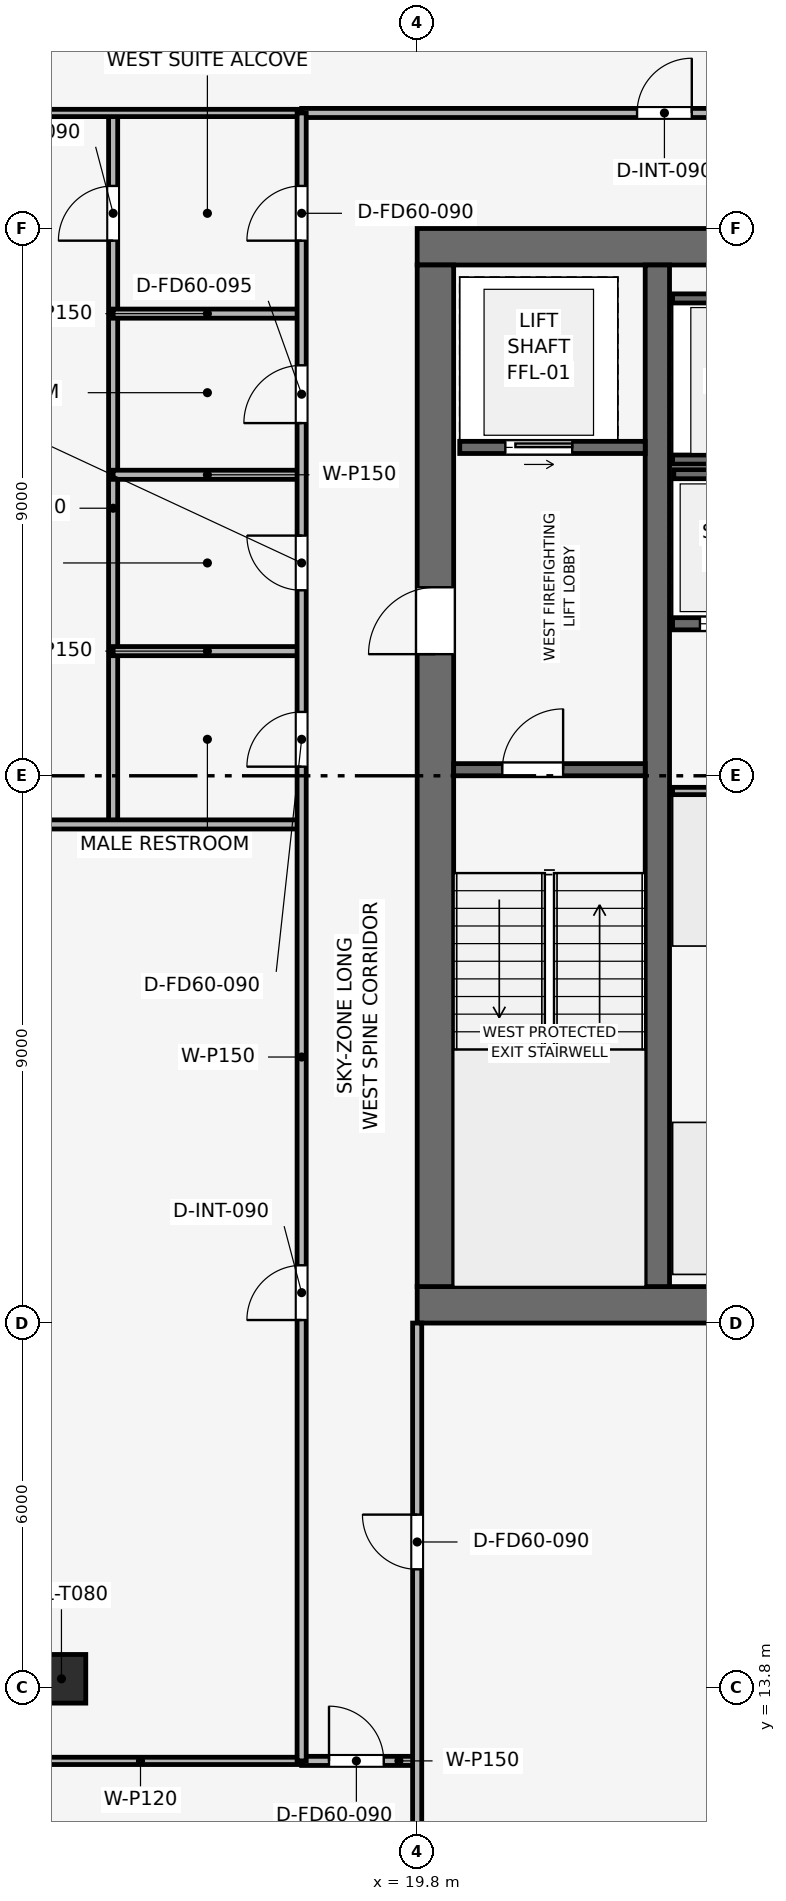
"""IFC4 building model, lengths in metres.
Left out: names, types, materials, properties, quantities, classifications, styles, units other than length and angle.
Written with IfcOpenShell. Run it as: python <this file> out.ifc"""

import sys

from ifc_helpers import new_model, si_unit, direction, frame, frame_2d, origin, origin_2d, place, context, subcontext, project, spatial, rectangle, extrude, element, fill, save


model = new_model("IFC4")
c1 = context("Model", 3, precision=1e-05, world=origin(), true_north=direction((0.0, 1.0)))
c2 = subcontext(c1, "Body", "Model", "MODEL_VIEW")
j1 = project(units=[si_unit("LENGTHUNIT", "METRE"), si_unit("PLANEANGLEUNIT", "RADIAN")], contexts=[c1])
p1 = place(None, origin())
s1 = spatial("IfcSite", under=j1, at=p1, CompositionType="ELEMENT")
p2 = place(p1, origin())
s2 = spatial("IfcBuilding", under=s1, at=p2, CompositionType="ELEMENT")
p3 = place(p2, frame((0.0, 0.0, 336.75)))
s3 = spatial("IfcBuildingStorey", under=s2, at=p3, CompositionType="ELEMENT", Elevation=336.75)
p4 = place(p3, frame((19.8, 20.1, 0.0), z_axis=(0.0, 0.0, 1.0), x_axis=(1.0, 0.0, 0.0)))
e1 = element("IfcWall", 1, at=p4, inside=s3, PredefinedType="SHEAR", context=c2, shape_type="SweptSolid", body=[
    extrude(rectangle(XDim=18.0, YDim=0.6, at=frame_2d((9.0, 0.0))), origin(), (0.0, 0.0, 1.0), 3.75),
])
p5 = place(p3, frame((19.8, 37.5, 0.0), z_axis=(0.0, 0.0, 1.0), x_axis=(1.0, 0.0, 0.0)))
e2 = element("IfcWall", 2, at=p5, inside=s3, PredefinedType="SHEAR", context=c2, shape_type="SweptSolid", body=[
    extrude(rectangle(XDim=18.0, YDim=0.6, at=frame_2d((9.0, 0.0))), origin(), (0.0, 0.0, 1.0), 3.75),
])
p6 = place(p5, frame((7.05, 0.0, 0.0)))
e3 = element("IfcOpeningElement", 3, at=p6, cuts=e2, PredefinedType="OPENING", context=c2, shape_type="SweptSolid", body=[
    extrude(rectangle(XDim=1.1, YDim=2.15, at=frame_2d((0.55, 1.075))), frame((0.0, 0.31, 0.0), z_axis=(0.0, -1.0, 0.0), x_axis=(1.0, 0.0, 0.0)), (0.0, 0.0, 1.0), 0.62),
])
p7 = place(p3, frame((20.1, 20.4, 0.0), z_axis=(0.0, 0.0, 1.0), x_axis=(0.0, 1.0, 0.0)))
e4 = element("IfcWall", 4, at=p7, inside=s3, PredefinedType="SHEAR", context=c2, shape_type="SweptSolid", body=[
    extrude(rectangle(XDim=16.8, YDim=0.6, at=frame_2d((8.4, 0.0))), origin(), (0.0, 0.0, 1.0), 3.75),
])
p8 = place(p7, frame((10.4, 0.0, 0.0)))
e5 = element("IfcOpeningElement", 5, at=p8, cuts=e4, PredefinedType="OPENING", context=c2, shape_type="SweptSolid", body=[
    extrude(rectangle(XDim=1.1, YDim=2.15, at=frame_2d((0.55, 1.075))), frame((0.0, 0.31, 0.0), z_axis=(0.0, -1.0, 0.0), x_axis=(1.0, 0.0, 0.0)), (0.0, 0.0, 1.0), 0.62),
])
p9 = place(p3, frame((23.75, 20.4, 0.0), z_axis=(0.0, 0.0, 1.0), x_axis=(0.0, 1.0, 0.0)))
e6 = element("IfcWall", 6, at=p9, inside=s3, PredefinedType="SHEAR", context=c2, shape_type="SweptSolid", body=[
    extrude(rectangle(XDim=16.8, YDim=0.4, at=frame_2d((8.4, 0.0))), origin(), (0.0, 0.0, 1.0), 3.75),
])
p10 = place(p3, frame((13.95, 13.95, 0.003), z_axis=(0.0, 0.0, 1.0), x_axis=(1.0, 0.0, 0.0)))
e7 = element("IfcColumn", 7, at=p10, inside=s3, PredefinedType="COLUMN", context=c2, shape_type="SweptSolid", body=[
    extrude(rectangle(XDim=0.8, YDim=0.8, at=origin_2d()), origin(), (0.0, 0.0, 1.0), 3.504),
])
p11 = place(p3, frame((20.4, 28.9, 0.0), z_axis=(0.0, 0.0, 1.0), x_axis=(1.0, 0.0, 0.0)))
e8 = element("IfcWall", 8, at=p11, inside=s3, PredefinedType="SHEAR", context=c2, shape_type="SweptSolid", body=[
    extrude(rectangle(XDim=3.15, YDim=0.2, at=frame_2d((1.575, 0.0))), origin(), (0.0, 0.0, 1.0), 3.51),
])
p12 = place(p11, frame((0.8, 0.0, 0.0)))
e9 = element("IfcOpeningElement", 9, at=p12, cuts=e8, PredefinedType="OPENING", context=c2, shape_type="SweptSolid", body=[
    extrude(rectangle(XDim=1.0, YDim=2.1, at=frame_2d((0.5, 1.05))), frame((0.0, 0.11, 0.0), z_axis=(0.0, -1.0, 0.0), x_axis=(1.0, 0.0, 0.0)), (0.0, 0.0, 1.0), 0.22),
])
p13 = place(p3, frame((20.5, 34.2, 0.0), z_axis=(0.0, 0.0, 1.0), x_axis=(1.0, 0.0, 0.0)))
e10 = element("IfcWall", 10, at=p13, inside=s3, PredefinedType="SHEAR", context=c2, shape_type="SweptSolid", body=[
    extrude(rectangle(XDim=3.05, YDim=0.2, at=frame_2d((1.525, 0.0))), origin(), (0.0, 0.0, 1.0), 3.51),
])
p14 = place(p13, frame((0.75, 0.0, 0.0)))
e11 = element("IfcOpeningElement", 11, at=p14, cuts=e10, PredefinedType="OPENING", context=c2, shape_type="SweptSolid", body=[
    extrude(rectangle(XDim=1.1, YDim=2.15, at=frame_2d((0.55, 1.075))), frame((0.0, 0.11, 0.0), z_axis=(0.0, -1.0, 0.0), x_axis=(1.0, 0.0, 0.0)), (0.0, 0.0, 1.0), 0.22),
])
for number, where, z_axis, x_axis in (
    (12, (24.0, 34.0, 0.0), (0.0, 0.0, 1.0), (1.0, 0.0, 0.0)),
    (13, (24.0, 36.65, 0.0), (0.0, 0.0, 1.0), (1.0, 0.0, 0.0)),
):
    element("IfcWall", number, at=place(p3, frame(where, z_axis=z_axis, x_axis=x_axis)), inside=s3, PredefinedType="SHEAR", context=c2, shape_type="SweptSolid", body=[
        extrude(rectangle(XDim=2.48, YDim=0.15, at=frame_2d((1.24, 0.0))), origin(), (0.0, 0.0, 1.0), 3.51),
    ])
p15 = place(p3, frame((24.0, 31.3, 0.0), z_axis=(0.0, 0.0, 1.0), x_axis=(1.0, 0.0, 0.0)))
e14 = element("IfcWall", 14, at=p15, inside=s3, PredefinedType="SHEAR", context=c2, shape_type="SweptSolid", body=[
    extrude(rectangle(XDim=2.0, YDim=0.2, at=frame_2d((1.0, 0.0))), origin(), (0.0, 0.0, 1.0), 3.51),
])
p16 = place(p15, frame((0.45, 0.0, 0.0)))
e15 = element("IfcOpeningElement", 15, at=p16, cuts=e14, PredefinedType="OPENING", context=c2, shape_type="SweptSolid", body=[
    extrude(rectangle(XDim=1.1, YDim=2.15, at=frame_2d((0.55, 1.075))), frame((0.0, 0.11, 0.0), z_axis=(0.0, -1.0, 0.0), x_axis=(1.0, 0.0, 0.0)), (0.0, 0.0, 1.0), 0.22),
])
p17 = place(p3, frame((24.02, 33.76, 0.0), z_axis=(0.0, 0.0, 1.0), x_axis=(1.0, 0.0, 0.0)))
e16 = element("IfcWall", 16, at=p17, inside=s3, PredefinedType="SHEAR", context=c2, shape_type="SweptSolid", body=[
    extrude(rectangle(XDim=4.08, YDim=0.15, at=frame_2d((2.04, 0.0))), origin(), (0.0, 0.0, 1.0), 3.51),
])
p18 = place(p3, frame((24.0, 28.55, 0.0), z_axis=(0.0, 0.0, 1.0), x_axis=(1.0, 0.0, 0.0)))
e17 = element("IfcWall", 17, at=p18, inside=s3, PredefinedType="PARTITIONING", context=c2, shape_type="SweptSolid", body=[
    extrude(rectangle(XDim=4.05, YDim=0.12, at=frame_2d((2.025, 0.0))), origin(), (0.0, 0.0, 1.0), 3.51),
])
p19 = place(p18, frame((1.575, 0.0, 0.0)))
e18 = element("IfcOpeningElement", 18, at=p19, cuts=e17, PredefinedType="OPENING", context=c2, shape_type="SweptSolid", body=[
    extrude(rectangle(XDim=0.9, YDim=2.1, at=frame_2d((0.45, 1.05))), frame((0.0, 0.07, 0.0), z_axis=(0.0, -1.0, 0.0), x_axis=(1.0, 0.0, 0.0)), (0.0, 0.0, 1.0), 0.14),
])
p20 = place(p3, frame((14.8, 28.0, 0.0), z_axis=(0.0, 0.0, 1.0), x_axis=(0.0, 1.0, 0.0)))
e19 = element("IfcWall", 19, at=p20, inside=s3, PredefinedType="PARTITIONING", context=c2, shape_type="SweptSolid", body=[
    extrude(rectangle(XDim=11.7, YDim=0.15, at=frame_2d((5.85, 0.0))), origin(), (0.0, 0.0, 1.0), 3.095),
])
p21 = place(p20, frame((9.6, 0.0, 0.0)))
e20 = element("IfcOpeningElement", 20, at=p21, cuts=e19, PredefinedType="OPENING", context=c2, shape_type="SweptSolid", body=[
    extrude(rectangle(XDim=0.9, YDim=2.1, at=frame_2d((0.45, 1.05))), frame((0.0, 0.085, 0.0), z_axis=(0.0, -1.0, 0.0), x_axis=(1.0, 0.0, 0.0)), (0.0, 0.0, 1.0), 0.17),
])
p22 = place(p3, frame((6.73, 28.0, 0.0), z_axis=(0.0, 0.0, 1.0), x_axis=(1.0, 0.0, 0.0)))
e21 = element("IfcWall", 21, at=p22, inside=s3, PredefinedType="PARTITIONING", context=c2, shape_type="SweptSolid", body=[
    extrude(rectangle(XDim=11.17, YDim=0.15, at=frame_2d((5.585, 0.0))), origin(), (0.0, 0.0, 1.0), 3.135),
])
for number, where, z_axis, x_axis in (
    (22, (14.8, 36.4, 0.0), (0.0, 0.0, 1.0), (1.0, 0.0, 0.0)),
    (23, (14.8, 30.85, 0.0), (0.0, 0.0, 1.0), (1.0, 0.0, 0.0)),
    (24, (14.8, 33.75, 0.0), (0.0, 0.0, 1.0), (1.0, 0.0, 0.0)),
):
    element("IfcWall", number, at=place(p3, frame(where, z_axis=z_axis, x_axis=x_axis)), inside=s3, PredefinedType="PARTITIONING", context=c2, shape_type="SweptSolid", body=[
        extrude(rectangle(XDim=3.1, YDim=0.15, at=frame_2d((1.55, 0.0))), origin(), (0.0, 0.0, 1.0), 3.135),
    ])
p23 = place(p3, frame((12.6, 12.6, 0.0), z_axis=(0.0, 0.0, 1.0), x_axis=(1.0, 0.0, 0.0)))
e25 = element("IfcWall", 25, at=p23, inside=s3, PredefinedType="PARTITIONING", context=c2, shape_type="SweptSolid", body=[
    extrude(rectangle(XDim=5.3, YDim=0.12, at=frame_2d((2.65, 0.0))), origin(), (0.0, 0.0, 1.0), 3.195),
])
p24 = place(p3, frame((17.9, 12.6, 0.0), z_axis=(0.0, 0.0, 1.0), x_axis=(1.0, 0.0, 0.0)))
e26 = element("IfcWall", 26, at=p24, inside=s3, PredefinedType="PARTITIONING", context=c2, shape_type="SweptSolid", body=[
    extrude(rectangle(XDim=1.9, YDim=0.15, at=frame_2d((0.95, 0.0))), origin(), (0.0, 0.0, 1.0), 3.51),
])
p25 = place(p24, frame((0.45, 0.0, 0.0)))
e27 = element("IfcOpeningElement", 27, at=p25, cuts=e26, PredefinedType="OPENING", context=c2, shape_type="SweptSolid", body=[
    extrude(rectangle(XDim=0.9, YDim=2.1, at=frame_2d((0.45, 1.05))), frame((0.0, 0.085, 0.0), z_axis=(0.0, -1.0, 0.0), x_axis=(1.0, 0.0, 0.0)), (0.0, 0.0, 1.0), 0.17),
])
p26 = place(p3, frame((19.8, 6.73, 0.0), z_axis=(0.0, 0.0, 1.0), x_axis=(0.0, 1.0, 0.0)))
e28 = element("IfcWall", 28, at=p26, inside=s3, PredefinedType="PARTITIONING", context=c2, shape_type="SweptSolid", body=[
    extrude(rectangle(XDim=13.07, YDim=0.15, at=frame_2d((6.535, 0.0))), origin(), (0.0, 0.0, 1.0), 3.095),
])
p27 = place(p26, frame((9.02, 0.0, 0.0)))
e29 = element("IfcOpeningElement", 29, at=p27, cuts=e28, PredefinedType="OPENING", context=c2, shape_type="SweptSolid", body=[
    extrude(rectangle(XDim=0.9, YDim=2.1, at=frame_2d((0.45, 1.05))), frame((0.0, 0.085, 0.0), z_axis=(0.0, -1.0, 0.0), x_axis=(1.0, 0.0, 0.0)), (0.0, 0.0, 1.0), 0.17),
])
p28 = place(p3, frame((6.73, 39.7, 0.0), z_axis=(0.0, 0.0, 1.0), x_axis=(1.0, 0.0, 0.0)))
e30 = element("IfcWall", 30, at=p28, inside=s3, PredefinedType="PARTITIONING", context=c2, shape_type="SweptSolid", body=[
    extrude(rectangle(XDim=11.17, YDim=0.12, at=frame_2d((5.585, 0.0))), origin(), (0.0, 0.0, 1.0), 3.095),
])
p29 = place(p3, frame((17.9, 39.7, 0.0), z_axis=(0.0, 0.0, 1.0), x_axis=(1.0, 0.0, 0.0)))
e31 = element("IfcWall", 31, at=p29, inside=s3, PredefinedType="PARTITIONING", context=c2, shape_type="SweptSolid", body=[
    extrude(rectangle(XDim=21.8, YDim=0.15, at=frame_2d((10.9, 0.0))), origin(), (0.0, 0.0, 1.0), 3.095),
])
p30 = place(p29, frame((5.516, 0.0, 0.0)))
e32 = element("IfcOpeningElement", 32, at=p30, cuts=e31, PredefinedType="OPENING", context=c2, shape_type="SweptSolid", body=[
    extrude(rectangle(XDim=0.9, YDim=2.1, at=frame_2d((0.45, 1.05))), frame((0.0, 0.085, 0.0), z_axis=(0.0, -1.0, 0.0), x_axis=(1.0, 0.0, 0.0)), (0.0, 0.0, 1.0), 0.17),
])
p31 = place(p29, frame((16.416, 0.0, 0.0)))
e33 = element("IfcOpeningElement", 33, at=p31, cuts=e31, PredefinedType="OPENING", context=c2, shape_type="SweptSolid", body=[
    extrude(rectangle(XDim=0.9, YDim=2.1, at=frame_2d((0.45, 1.05))), frame((0.0, 0.085, 0.0), z_axis=(0.0, -1.0, 0.0), x_axis=(1.0, 0.0, 0.0)), (0.0, 0.0, 1.0), 0.17),
])
p32 = place(p3, frame((17.9, 12.6, 0.0), z_axis=(0.0, 0.0, 1.0), x_axis=(0.0, 1.0, 0.0)))
e34 = element("IfcWall", 34, at=p32, inside=s3, PredefinedType="PARTITIONING", context=c2, shape_type="SweptSolid", body=[
    extrude(rectangle(XDim=27.1, YDim=0.15, at=frame_2d((13.55, 0.0))), origin(), (0.0, 0.0, 1.0), 3.095),
])
p33 = place(p32, frame((7.25, 0.0, 0.0)))
e35 = element("IfcOpeningElement", 35, at=p33, cuts=e34, PredefinedType="OPENING", context=c2, shape_type="SweptSolid", body=[
    extrude(rectangle(XDim=0.9, YDim=2.1, at=frame_2d((0.45, 1.05))), frame((0.0, 0.085, 0.0), z_axis=(0.0, -1.0, 0.0), x_axis=(1.0, 0.0, 0.0)), (0.0, 0.0, 1.0), 0.17),
])
p34 = place(p32, frame((16.35, 0.0, 0.0)))
e36 = element("IfcOpeningElement", 36, at=p34, cuts=e34, PredefinedType="OPENING", context=c2, shape_type="SweptSolid", body=[
    extrude(rectangle(XDim=0.9, YDim=2.1, at=frame_2d((0.45, 1.05))), frame((0.0, 0.085, 0.0), z_axis=(0.0, -1.0, 0.0), x_axis=(1.0, 0.0, 0.0)), (0.0, 0.0, 1.0), 0.17),
])
p35 = place(p32, frame((19.25, 0.0, 0.0)))
e37 = element("IfcOpeningElement", 37, at=p35, cuts=e34, PredefinedType="OPENING", context=c2, shape_type="SweptSolid", body=[
    extrude(rectangle(XDim=0.9, YDim=2.1, at=frame_2d((0.45, 1.05))), frame((0.0, 0.085, 0.0), z_axis=(0.0, -1.0, 0.0), x_axis=(1.0, 0.0, 0.0)), (0.0, 0.0, 1.0), 0.17),
])
p36 = place(p32, frame((22.0, 0.0, 0.0)))
e38 = element("IfcOpeningElement", 38, at=p36, cuts=e34, PredefinedType="OPENING", context=c2, shape_type="SweptSolid", body=[
    extrude(rectangle(XDim=0.95, YDim=2.1, at=frame_2d((0.475, 1.05))), frame((0.0, 0.085, 0.0), z_axis=(0.0, -1.0, 0.0), x_axis=(1.0, 0.0, 0.0)), (0.0, 0.0, 1.0), 0.17),
])
p37 = place(p32, frame((25.0, 0.0, 0.0)))
e39 = element("IfcOpeningElement", 39, at=p37, cuts=e34, PredefinedType="OPENING", context=c2, shape_type="SweptSolid", body=[
    extrude(rectangle(XDim=0.9, YDim=2.1, at=frame_2d((0.45, 1.05))), frame((0.0, 0.085, 0.0), z_axis=(0.0, -1.0, 0.0), x_axis=(1.0, 0.0, 0.0)), (0.0, 0.0, 1.0), 0.17),
])
p38 = place(p12, origin())
e40 = element("IfcDoor", 40, at=p38, inside=s3, OperationType="SINGLE_SWING_RIGHT", PredefinedType="DOOR", context=c2, shape_type="SweptSolid", body=[
    extrude(rectangle(XDim=1.0, YDim=2.1, at=frame_2d((0.5, 1.05))), frame((0.0, 0.025, 0.0), z_axis=(0.0, -1.0, 0.0), x_axis=(1.0, 0.0, 0.0)), (0.0, 0.0, 1.0), 0.05),
])
fill(e9, e40)
p39 = place(p14, origin())
e41 = element("IfcDoor", 41, at=p39, inside=s3, OperationType="SLIDING_TO_RIGHT", PredefinedType="DOOR", context=c2, shape_type="SweptSolid", body=[
    extrude(rectangle(XDim=1.1, YDim=2.15, at=frame_2d((0.55, 1.075))), frame((0.0, 0.025, 0.0), z_axis=(0.0, -1.0, 0.0), x_axis=(1.0, 0.0, 0.0)), (0.0, 0.0, 1.0), 0.05),
])
fill(e11, e41)
p40 = place(p16, origin())
e42 = element("IfcDoor", 42, at=p40, inside=s3, OperationType="SLIDING_TO_RIGHT", PredefinedType="DOOR", context=c2, shape_type="SweptSolid", body=[
    extrude(rectangle(XDim=1.1, YDim=2.15, at=frame_2d((0.55, 1.075))), frame((0.0, 0.025, 0.0), z_axis=(0.0, -1.0, 0.0), x_axis=(1.0, 0.0, 0.0)), (0.0, 0.0, 1.0), 0.05),
])
fill(e15, e42)
p41 = place(p21, origin())
e43 = element("IfcDoor", 43, at=p41, inside=s3, OperationType="SINGLE_SWING_LEFT", PredefinedType="DOOR", context=c2, shape_type="SweptSolid", body=[
    extrude(rectangle(XDim=0.9, YDim=2.1, at=frame_2d((0.45, 1.05))), frame((0.0, 0.025, 0.0), z_axis=(0.0, -1.0, 0.0), x_axis=(1.0, 0.0, 0.0)), (0.0, 0.0, 1.0), 0.05),
])
fill(e20, e43)
p42 = place(p25, origin())
e44 = element("IfcDoor", 44, at=p42, inside=s3, OperationType="SINGLE_SWING_LEFT", PredefinedType="DOOR", context=c2, shape_type="SweptSolid", body=[
    extrude(rectangle(XDim=0.9, YDim=2.1, at=frame_2d((0.45, 1.05))), frame((0.0, 0.025, 0.0), z_axis=(0.0, -1.0, 0.0), x_axis=(1.0, 0.0, 0.0)), (0.0, 0.0, 1.0), 0.05),
])
fill(e27, e44)
p43 = place(p27, origin())
e45 = element("IfcDoor", 45, at=p43, inside=s3, OperationType="SINGLE_SWING_RIGHT", PredefinedType="DOOR", context=c2, shape_type="SweptSolid", body=[
    extrude(rectangle(XDim=0.9, YDim=2.1, at=frame_2d((0.45, 1.05))), frame((0.0, 0.025, 0.0), z_axis=(0.0, -1.0, 0.0), x_axis=(1.0, 0.0, 0.0)), (0.0, 0.0, 1.0), 0.05),
])
fill(e29, e45)
p44 = place(p30, origin())
e46 = element("IfcDoor", 46, at=p44, inside=s3, OperationType="SINGLE_SWING_RIGHT", PredefinedType="DOOR", context=c2, shape_type="SweptSolid", body=[
    extrude(rectangle(XDim=0.9, YDim=2.1, at=frame_2d((0.45, 1.05))), frame((0.0, 0.025, 0.0), z_axis=(0.0, -1.0, 0.0), x_axis=(1.0, 0.0, 0.0)), (0.0, 0.0, 1.0), 0.05),
])
fill(e32, e46)
p45 = place(p33, origin())
e47 = element("IfcDoor", 47, at=p45, inside=s3, OperationType="SINGLE_SWING_LEFT", PredefinedType="DOOR", context=c2, shape_type="SweptSolid", body=[
    extrude(rectangle(XDim=0.9, YDim=2.1, at=frame_2d((0.45, 1.05))), frame((0.0, 0.025, 0.0), z_axis=(0.0, -1.0, 0.0), x_axis=(1.0, 0.0, 0.0)), (0.0, 0.0, 1.0), 0.05),
])
fill(e35, e47)
p46 = place(p34, origin())
e48 = element("IfcDoor", 48, at=p46, inside=s3, OperationType="SINGLE_SWING_LEFT", PredefinedType="DOOR", context=c2, shape_type="SweptSolid", body=[
    extrude(rectangle(XDim=0.9, YDim=2.1, at=frame_2d((0.45, 1.05))), frame((0.0, 0.025, 0.0), z_axis=(0.0, -1.0, 0.0), x_axis=(1.0, 0.0, 0.0)), (0.0, 0.0, 1.0), 0.05),
])
fill(e36, e48)
p47 = place(p35, origin())
e49 = element("IfcDoor", 49, at=p47, inside=s3, OperationType="SINGLE_SWING_RIGHT", PredefinedType="DOOR", context=c2, shape_type="SweptSolid", body=[
    extrude(rectangle(XDim=0.9, YDim=2.1, at=frame_2d((0.45, 1.05))), frame((0.0, 0.025, 0.0), z_axis=(0.0, -1.0, 0.0), x_axis=(1.0, 0.0, 0.0)), (0.0, 0.0, 1.0), 0.05),
])
fill(e37, e49)
p48 = place(p36, origin())
e50 = element("IfcDoor", 50, at=p48, inside=s3, OperationType="SINGLE_SWING_LEFT", PredefinedType="DOOR", context=c2, shape_type="SweptSolid", body=[
    extrude(rectangle(XDim=0.95, YDim=2.1, at=frame_2d((0.475, 1.05))), frame((0.0, 0.025, 0.0), z_axis=(0.0, -1.0, 0.0), x_axis=(1.0, 0.0, 0.0)), (0.0, 0.0, 1.0), 0.05),
])
fill(e38, e50)
p49 = place(p37, origin())
e51 = element("IfcDoor", 51, at=p49, inside=s3, OperationType="SINGLE_SWING_LEFT", PredefinedType="DOOR", context=c2, shape_type="SweptSolid", body=[
    extrude(rectangle(XDim=0.9, YDim=2.1, at=frame_2d((0.45, 1.05))), frame((0.0, 0.025, 0.0), z_axis=(0.0, -1.0, 0.0), x_axis=(1.0, 0.0, 0.0)), (0.0, 0.0, 1.0), 0.05),
])
fill(e39, e51)
p50 = place(p8, origin())
e52 = element("IfcDoor", 52, at=p50, inside=s3, OperationType="SINGLE_SWING_LEFT", PredefinedType="DOOR", context=c2, shape_type="SweptSolid", body=[
    extrude(rectangle(XDim=1.1, YDim=2.15, at=frame_2d((0.55, 1.075))), frame((0.0, 0.025, 0.0), z_axis=(0.0, -1.0, 0.0), x_axis=(1.0, 0.0, 0.0)), (0.0, 0.0, 1.0), 0.05),
])
fill(e5, e52)
save(model, sys.argv[1])
